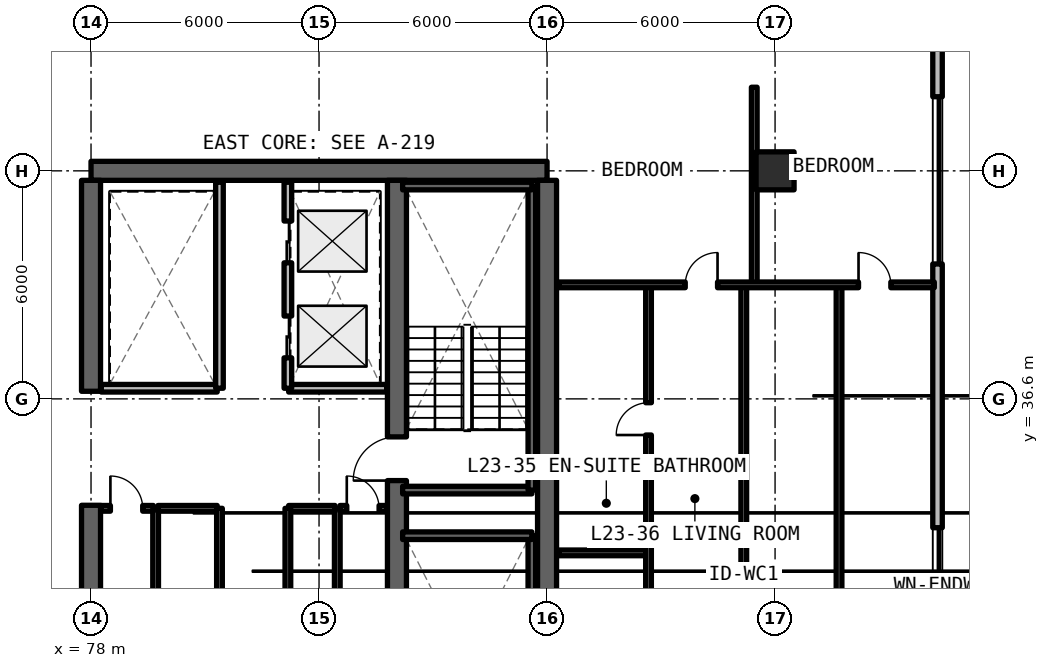
"""IFC4 building model, lengths in metres.
Left out: names, types, materials, properties, quantities, classifications, styles, units other than length and angle.
Written with IfcOpenShell. Run it as: python <this file> out.ifc"""

import sys

from ifc_helpers import new_model, si_unit, direction, frame, frame_2d, origin, origin_2d, place, context, subcontext, project, spatial, rectangle, extrude, element, fill, save


model = new_model("IFC4")
c1 = context("Model", 3, precision=1e-05, world=origin(), true_north=direction((0.0, 1.0)))
c2 = subcontext(c1, "Body", "Model", "MODEL_VIEW")
j1 = project(units=[si_unit("LENGTHUNIT", "METRE"), si_unit("PLANEANGLEUNIT", "RADIAN")], contexts=[c1])
p1 = place(None, origin())
s1 = spatial("IfcSite", under=j1, at=p1, CompositionType="ELEMENT")
p2 = place(p1, origin())
s2 = spatial("IfcBuilding", under=s1, at=p2, CompositionType="ELEMENT")
p3 = place(p2, frame((0.0, 0.0, 85.47)))
s3 = spatial("IfcBuildingStorey", under=s2, at=p3, CompositionType="ELEMENT", Elevation=85.47)
p4 = place(p3, frame((90.0, 42.6, 0.0), z_axis=(0.0, 0.0, 1.0), x_axis=(-1.0, 0.0, 0.0)))
e1 = element("IfcWall", 1, at=p4, inside=s3, PredefinedType="SHEAR", context=c2, shape_type="SweptSolid", body=[
    extrude(rectangle(XDim=12.0, YDim=0.5, at=frame_2d((6.0, 0.0))), origin(), (0.0, 0.0, 1.0), 3.3),
])
p5 = place(p3, frame((90.0, 24.85, 0.0), z_axis=(0.0, 0.0, 1.0), x_axis=(0.0, 1.0, 0.0)))
e2 = element("IfcWall", 2, at=p5, inside=s3, PredefinedType="SHEAR", context=c2, shape_type="SweptSolid", body=[
    extrude(rectangle(XDim=17.5, YDim=0.5, at=frame_2d((8.75, 0.0))), origin(), (0.0, 0.0, 1.0), 3.3),
])
p6 = place(p3, frame((78.0, 24.85, 0.0), z_axis=(0.0, 0.0, 1.0), x_axis=(0.0, 1.0, 0.0)))
e3 = element("IfcWall", 3, at=p6, inside=s3, PredefinedType="SHEAR", context=c2, shape_type="SweptSolid", body=[
    extrude(rectangle(XDim=8.95, YDim=0.5, at=frame_2d((4.475, 0.0))), origin(), (0.0, 0.0, 1.0), 3.3),
])
p7 = place(p3, frame((78.0, 36.8, 0.0), z_axis=(0.0, 0.0, 1.0), x_axis=(0.0, 1.0, 0.0)))
e4 = element("IfcWall", 4, at=p7, inside=s3, PredefinedType="SHEAR", context=c2, shape_type="SweptSolid", body=[
    extrude(rectangle(XDim=5.55, YDim=0.5, at=frame_2d((2.775, 0.0))), origin(), (0.0, 0.0, 1.0), 3.3),
])
p8 = place(p3, frame((86.05, 24.85, 0.0), z_axis=(0.0, 0.0, 1.0), x_axis=(0.0, 1.0, 0.0)))
e5 = element("IfcWall", 5, at=p8, inside=s3, PredefinedType="SHEAR", context=c2, shape_type="SweptSolid", body=[
    extrude(rectangle(XDim=17.5, YDim=0.5, at=frame_2d((8.75, 0.0))), origin(), (0.0, 0.0, 1.0), 3.3),
])
p9 = place(p8, frame((0.4, 0.0, 0.0)))
e6 = element("IfcOpeningElement", 6, at=p9, cuts=e5, PredefinedType="OPENING", context=c2, shape_type="SweptSolid", body=[
    extrude(rectangle(XDim=1.15, YDim=2.15, at=frame_2d((0.575, 1.075))), frame((0.0, 0.26, 0.0), z_axis=(0.0, -1.0, 0.0), x_axis=(1.0, 0.0, 0.0)), (0.0, 0.0, 1.0), 0.52),
])
p10 = place(p8, frame((9.6, 0.0, 0.0)))
e7 = element("IfcOpeningElement", 7, at=p10, cuts=e5, PredefinedType="OPENING", context=c2, shape_type="SweptSolid", body=[
    extrude(rectangle(XDim=1.15, YDim=2.15, at=frame_2d((0.575, 1.075))), frame((0.0, 0.26, 0.0), z_axis=(0.0, -1.0, 0.0), x_axis=(1.0, 0.0, 0.0)), (0.0, 0.0, 1.0), 0.52),
])
p11 = place(p3, frame((96.0, 42.6, 0.0), z_axis=(0.0, 0.0, 1.0), x_axis=(1.0, 0.0, 0.0)))
e8 = element("IfcColumn", 8, at=p11, inside=s3, PredefinedType="COLUMN", context=c2, shape_type="SweptSolid", body=[
    extrude(rectangle(XDim=1.0, YDim=1.0, at=origin_2d()), origin(), (0.0, 0.0, 1.0), 3.3),
])
p12 = place(p3, frame((100.275, 13.852, 0.0), z_axis=(0.0, 0.0, 1.0), x_axis=(0.0, 1.0, 0.0)))
e9 = element("IfcWall", 9, at=p12, inside=s3, PredefinedType="SOLIDWALL", context=c2, shape_type="SweptSolid", body=[
    extrude(rectangle(XDim=39.496, YDim=0.25, at=frame_2d((19.748, 0.0))), origin(), (0.0, 0.0, 1.0), 3.08),
])
p13 = place(p12, frame((36.448, 0.0, 0.0)))
e10 = element("IfcOpeningElement", 10, at=p13, cuts=e9, PredefinedType="OPENING", context=c2, shape_type="SweptSolid", body=[
    extrude(rectangle(XDim=1.1, YDim=2.15, at=frame_2d((0.55, 1.075))), frame((0.0, 0.135, 0.0), z_axis=(0.0, -1.0, 0.0), x_axis=(1.0, 0.0, 0.0)), (0.0, 0.0, 1.0), 0.27),
])
p14 = place(p12, frame((14.958, 0.0, 0.78)))
e11 = element("IfcOpeningElement", 11, at=p14, cuts=e9, PredefinedType="OPENING", context=c2, shape_type="SweptSolid", body=[
    extrude(rectangle(XDim=4.4, YDim=1.66, at=frame_2d((2.2, 0.83))), frame((0.0, 0.135, 0.0), z_axis=(0.0, -1.0, 0.0), x_axis=(1.0, 0.0, 0.0)), (0.0, 0.0, 1.0), 0.27),
])
p15 = place(p12, frame((26.298, 0.0, 0.78)))
e12 = element("IfcOpeningElement", 12, at=p15, cuts=e9, PredefinedType="OPENING", context=c2, shape_type="SweptSolid", body=[
    extrude(rectangle(XDim=4.4, YDim=1.66, at=frame_2d((2.2, 0.83))), frame((0.0, 0.135, 0.0), z_axis=(0.0, -1.0, 0.0), x_axis=(1.0, 0.0, 0.0)), (0.0, 0.0, 1.0), 0.27),
])
p16 = place(p12, frame((2.454, 0.0, 0.78)))
e13 = element("IfcOpeningElement", 13, at=p16, cuts=e9, PredefinedType="OPENING", context=c2, shape_type="SweptSolid", body=[
    extrude(rectangle(XDim=1.4, YDim=1.65, at=frame_2d((0.7, 0.825))), frame((0.0, 0.135, 0.0), z_axis=(0.0, -1.0, 0.0), x_axis=(1.0, 0.0, 0.0)), (0.0, 0.0, 1.0), 0.27),
])
p17 = place(p3, frame((84.48, 28.5, 0.0), z_axis=(0.0, 0.0, 1.0), x_axis=(0.0, 1.0, 0.0)))
e14 = element("IfcWall", 14, at=p17, inside=s3, PredefinedType="SOLIDWALL", context=c2, shape_type="SweptSolid", body=[
    extrude(rectangle(XDim=5.22, YDim=0.15, at=frame_2d((2.61, 0.0))), origin(), (0.0, 0.0, 1.0), 2.35),
])
p18 = place(p3, frame((84.55, 33.72, 0.0), z_axis=(0.0, 0.0, 1.0), x_axis=(1.0, 0.0, 0.0)))
e15 = element("IfcWall", 15, at=p18, inside=s3, PredefinedType="SOLIDWALL", context=c2, shape_type="SweptSolid", body=[
    extrude(rectangle(XDim=1.23, YDim=0.15, at=frame_2d((0.615, 0.0))), origin(), (0.0, 0.0, 1.0), 2.35),
])
p19 = place(p18, frame((0.18, 0.0, 0.0)))
e16 = element("IfcOpeningElement", 16, at=p19, cuts=e15, PredefinedType="OPENING", context=c2, shape_type="SweptSolid", body=[
    extrude(rectangle(XDim=0.85, YDim=2.1, at=frame_2d((0.425, 1.05))), frame((0.0, 0.085, 0.0), z_axis=(0.0, -1.0, 0.0), x_axis=(1.0, 0.0, 0.0)), (0.0, 0.0, 1.0), 0.17),
])
p20 = place(p3, frame((83.2, 33.72, 0.0), z_axis=(0.0, 0.0, 1.0), x_axis=(1.0, 0.0, 0.0)))
e17 = element("IfcWall", 17, at=p20, inside=s3, PredefinedType="SOLIDWALL", context=c2, shape_type="SweptSolid", body=[
    extrude(rectangle(XDim=1.22, YDim=0.15, at=frame_2d((0.61, 0.0))), origin(), (0.0, 0.0, 1.0), 2.35),
])
p21 = place(p3, frame((83.18, 28.5, 0.0), z_axis=(0.0, 0.0, 1.0), x_axis=(0.0, 1.0, 0.0)))
e18 = element("IfcWall", 18, at=p21, inside=s3, PredefinedType="SOLIDWALL", context=c2, shape_type="SweptSolid", body=[
    extrude(rectangle(XDim=5.22, YDim=0.15, at=frame_2d((2.61, 0.0))), origin(), (0.0, 0.0, 1.0), 2.35),
])
p22 = place(p21, frame((2.0, 0.0, 0.0)))
e19 = element("IfcOpeningElement", 19, at=p22, cuts=e18, PredefinedType="OPENING", context=c2, shape_type="SweptSolid", body=[
    extrude(rectangle(XDim=0.95, YDim=2.15, at=frame_2d((0.475, 1.075))), frame((0.0, 0.085, 0.0), z_axis=(0.0, -1.0, 0.0), x_axis=(1.0, 0.0, 0.0)), (0.0, 0.0, 1.0), 0.17),
])
p23 = place(p3, frame((79.7, 28.5, 0.0), z_axis=(0.0, 0.0, 1.0), x_axis=(0.0, 1.0, 0.0)))
e20 = element("IfcWall", 20, at=p23, inside=s3, PredefinedType="SOLIDWALL", context=c2, shape_type="SweptSolid", body=[
    extrude(rectangle(XDim=5.22, YDim=0.15, at=frame_2d((2.61, 0.0))), origin(), (0.0, 0.0, 1.0), 2.35),
])
p24 = place(p3, frame((79.76, 33.72, 0.0), z_axis=(0.0, 0.0, 1.0), x_axis=(1.0, 0.0, 0.0)))
e21 = element("IfcWall", 21, at=p24, inside=s3, PredefinedType="SOLIDWALL", context=c2, shape_type="SweptSolid", body=[
    extrude(rectangle(XDim=1.56, YDim=0.15, at=frame_2d((0.78, 0.0))), origin(), (0.0, 0.0, 1.0), 2.35),
])
p25 = place(p3, frame((78.27, 33.72, 0.0), z_axis=(0.0, 0.0, 1.0), x_axis=(1.0, 0.0, 0.0)))
e22 = element("IfcWall", 22, at=p25, inside=s3, PredefinedType="SOLIDWALL", context=c2, shape_type="SweptSolid", body=[
    extrude(rectangle(XDim=1.37, YDim=0.15, at=frame_2d((0.685, 0.0))), origin(), (0.0, 0.0, 1.0), 2.35),
])
p26 = place(p25, frame((0.24, 0.0, 0.0)))
e23 = element("IfcOpeningElement", 23, at=p26, cuts=e22, PredefinedType="OPENING", context=c2, shape_type="SweptSolid", body=[
    extrude(rectangle(XDim=0.85, YDim=2.1, at=frame_2d((0.425, 1.05))), frame((0.0, 0.085, 0.0), z_axis=(0.0, -1.0, 0.0), x_axis=(1.0, 0.0, 0.0)), (0.0, 0.0, 1.0), 0.17),
])
p27 = place(p3, frame((81.38, 28.5, 0.0), z_axis=(0.0, 0.0, 1.0), x_axis=(0.0, 1.0, 0.0)))
e24 = element("IfcWall", 24, at=p27, inside=s3, PredefinedType="SOLIDWALL", context=c2, shape_type="SweptSolid", body=[
    extrude(rectangle(XDim=5.22, YDim=0.15, at=frame_2d((2.61, 0.0))), origin(), (0.0, 0.0, 1.0), 2.35),
])
p28 = place(p27, frame((2.0, 0.0, 0.0)))
e25 = element("IfcOpeningElement", 25, at=p28, cuts=e24, PredefinedType="OPENING", context=c2, shape_type="SweptSolid", body=[
    extrude(rectangle(XDim=0.95, YDim=2.15, at=frame_2d((0.475, 1.075))), frame((0.0, 0.085, 0.0), z_axis=(0.0, -1.0, 0.0), x_axis=(1.0, 0.0, 0.0)), (0.0, 0.0, 1.0), 0.17),
])
p29 = place(p3, frame((83.2, 36.88, 0.0), z_axis=(0.0, 0.0, 1.0), x_axis=(1.0, 0.0, 0.0)))
e26 = element("IfcWall", 26, at=p29, inside=s3, PredefinedType="SOLIDWALL", context=c2, shape_type="SweptSolid", body=[
    extrude(rectangle(XDim=2.58, YDim=0.2, at=frame_2d((1.29, 0.0))), origin(), (0.0, 0.0, 1.0), 2.35),
])
p30 = place(p3, frame((83.18, 36.88, 0.0), z_axis=(0.0, 0.0, 1.0), x_axis=(0.0, 1.0, 0.0)))
e27 = element("IfcWall", 27, at=p30, inside=s3, PredefinedType="SOLIDWALL", context=c2, shape_type="SweptSolid", body=[
    extrude(rectangle(XDim=5.42, YDim=0.2, at=frame_2d((2.71, 0.0))), origin(), (0.0, 0.0, 1.0), 2.35),
])
p31 = place(p30, frame((0.8, 0.0, 0.0)))
e28 = element("IfcOpeningElement", 28, at=p31, cuts=e27, PredefinedType="OPENING", context=c2, shape_type="SweptSolid", body=[
    extrude(rectangle(XDim=1.1, YDim=2.2, at=frame_2d((0.55, 1.1))), frame((0.0, 0.11, 0.0), z_axis=(0.0, -1.0, 0.0), x_axis=(1.0, 0.0, 0.0)), (0.0, 0.0, 1.0), 0.22),
])
p32 = place(p30, frame((3.3, 0.0, 0.0)))
e29 = element("IfcOpeningElement", 29, at=p32, cuts=e27, PredefinedType="OPENING", context=c2, shape_type="SweptSolid", body=[
    extrude(rectangle(XDim=1.1, YDim=2.2, at=frame_2d((0.55, 1.1))), frame((0.0, 0.11, 0.0), z_axis=(0.0, -1.0, 0.0), x_axis=(1.0, 0.0, 0.0)), (0.0, 0.0, 1.0), 0.22),
])
p33 = place(p3, frame((78.27, 36.88, 0.0), z_axis=(0.0, 0.0, 1.0), x_axis=(1.0, 0.0, 0.0)))
e30 = element("IfcWall", 30, at=p33, inside=s3, PredefinedType="SOLIDWALL", context=c2, shape_type="SweptSolid", body=[
    extrude(rectangle(XDim=3.05, YDim=0.2, at=frame_2d((1.525, 0.0))), origin(), (0.0, 0.0, 1.0), 2.35),
])
p34 = place(p3, frame((81.38, 36.88, 0.0), z_axis=(0.0, 0.0, 1.0), x_axis=(0.0, 1.0, 0.0)))
e31 = element("IfcWall", 31, at=p34, inside=s3, PredefinedType="SOLIDWALL", context=c2, shape_type="SweptSolid", body=[
    extrude(rectangle(XDim=5.42, YDim=0.2, at=frame_2d((2.71, 0.0))), origin(), (0.0, 0.0, 1.0), 2.35),
])
p35 = place(p3, frame((95.177, 22.4, 0.0), z_axis=(0.0, 0.0, 1.0), x_axis=(0.0, 1.0, 0.0)))
e32 = element("IfcWall", 32, at=p35, inside=s3, PredefinedType="PARTITIONING", context=c2, shape_type="SweptSolid", body=[
    extrude(rectangle(XDim=17.2, YDim=0.15, at=frame_2d((8.6, 0.0))), origin(), (0.0, 0.0, 1.0), 2.35),
])
p36 = place(p35, frame((8.175, 0.0, 0.0)))
e33 = element("IfcOpeningElement", 33, at=p36, cuts=e32, PredefinedType="OPENING", context=c2, shape_type="SweptSolid", body=[
    extrude(rectangle(XDim=0.85, YDim=2.1, at=frame_2d((0.425, 1.05))), frame((0.0, 0.085, 0.0), z_axis=(0.0, -1.0, 0.0), x_axis=(1.0, 0.0, 0.0)), (0.0, 0.0, 1.0), 0.17),
])
p37 = place(p3, frame((97.683, 22.4, 0.0), z_axis=(0.0, 0.0, 1.0), x_axis=(0.0, 1.0, 0.0)))
e34 = element("IfcWall", 34, at=p37, inside=s3, PredefinedType="PARTITIONING", context=c2, shape_type="SweptSolid", body=[
    extrude(rectangle(XDim=17.2, YDim=0.15, at=frame_2d((8.6, 0.0))), origin(), (0.0, 0.0, 1.0), 2.35),
])
p38 = place(p37, frame((8.175, 0.0, 0.0)))
e35 = element("IfcOpeningElement", 35, at=p38, cuts=e34, PredefinedType="OPENING", context=c2, shape_type="SweptSolid", body=[
    extrude(rectangle(XDim=0.85, YDim=2.1, at=frame_2d((0.425, 1.05))), frame((0.0, 0.085, 0.0), z_axis=(0.0, -1.0, 0.0), x_axis=(1.0, 0.0, 0.0)), (0.0, 0.0, 1.0), 0.17),
])
p39 = place(p3, frame((90.32, 32.548, 0.0), z_axis=(0.0, 0.0, 1.0), x_axis=(1.0, 0.0, 0.0)))
e36 = element("IfcWall", 36, at=p39, inside=s3, PredefinedType="PARTITIONING", context=c2, shape_type="SweptSolid", body=[
    extrude(rectangle(XDim=2.35, YDim=0.15, at=frame_2d((1.175, 0.0))), origin(), (0.0, 0.0, 1.0), 2.35),
])
p40 = place(p3, frame((92.67, 22.4, 0.0), z_axis=(0.0, 0.0, 1.0), x_axis=(0.0, 1.0, 0.0)))
e37 = element("IfcWall", 37, at=p40, inside=s3, PredefinedType="PARTITIONING", context=c2, shape_type="SweptSolid", body=[
    extrude(rectangle(XDim=17.2, YDim=0.15, at=frame_2d((8.6, 0.0))), origin(), (0.0, 0.0, 1.0), 2.35),
])
p41 = place(p40, frame((4.649, 0.0, 0.0)))
e38 = element("IfcOpeningElement", 38, at=p41, cuts=e37, PredefinedType="OPENING", context=c2, shape_type="SweptSolid", body=[
    extrude(rectangle(XDim=0.85, YDim=2.1, at=frame_2d((0.425, 1.05))), frame((0.0, 0.085, 0.0), z_axis=(0.0, -1.0, 0.0), x_axis=(1.0, 0.0, 0.0)), (0.0, 0.0, 1.0), 0.17),
])
p42 = place(p40, frame((13.249, 0.0, 0.0)))
e39 = element("IfcOpeningElement", 39, at=p42, cuts=e37, PredefinedType="OPENING", context=c2, shape_type="SweptSolid", body=[
    extrude(rectangle(XDim=0.85, YDim=2.1, at=frame_2d((0.425, 1.05))), frame((0.0, 0.085, 0.0), z_axis=(0.0, -1.0, 0.0), x_axis=(1.0, 0.0, 0.0)), (0.0, 0.0, 1.0), 0.17),
])
p43 = place(p3, frame((95.452, 39.6, 0.0), z_axis=(0.0, 0.0, 1.0), x_axis=(0.0, 1.0, 0.0)))
e40 = element("IfcWall", 40, at=p43, inside=s3, PredefinedType="PARTITIONING", context=c2, shape_type="SweptSolid", body=[
    extrude(rectangle(XDim=5.2, YDim=0.15, at=frame_2d((2.6, 0.0))), origin(), (0.0, 0.0, 1.0), 2.35),
])
p44 = place(p3, frame((90.32, 39.6, 0.0), z_axis=(0.0, 0.0, 1.0), x_axis=(1.0, 0.0, 0.0)))
e41 = element("IfcWall", 41, at=p44, inside=s3, PredefinedType="PARTITIONING", context=c2, shape_type="SweptSolid", body=[
    extrude(rectangle(XDim=9.87, YDim=0.15, at=frame_2d((4.935, 0.0))), origin(), (0.0, 0.0, 1.0), 2.35),
])
p45 = place(p44, frame((3.316, 0.0, 0.0)))
e42 = element("IfcOpeningElement", 42, at=p45, cuts=e41, PredefinedType="OPENING", context=c2, shape_type="SweptSolid", body=[
    extrude(rectangle(XDim=0.85, YDim=2.1, at=frame_2d((0.425, 1.05))), frame((0.0, 0.085, 0.0), z_axis=(0.0, -1.0, 0.0), x_axis=(1.0, 0.0, 0.0)), (0.0, 0.0, 1.0), 0.17),
])
p46 = place(p44, frame((7.876, 0.0, 0.0)))
e43 = element("IfcOpeningElement", 43, at=p46, cuts=e41, PredefinedType="OPENING", context=c2, shape_type="SweptSolid", body=[
    extrude(rectangle(XDim=0.85, YDim=2.1, at=frame_2d((0.425, 1.05))), frame((0.0, 0.085, 0.0), z_axis=(0.0, -1.0, 0.0), x_axis=(1.0, 0.0, 0.0)), (0.0, 0.0, 1.0), 0.17),
])
p47 = place(p3, frame((89.6, 25.0, 0.0), z_axis=(0.0, 0.0, 1.0), x_axis=(0.0, 1.0, 0.0)))
e44 = element("IfcWall", 44, at=p47, inside=s3, PredefinedType="SOLIDWALL", context=c2, shape_type="SweptSolid", body=[
    extrude(rectangle(XDim=8.0, YDim=0.2, at=frame_2d((4.0, 0.0))), origin(), (0.0, 0.0, 1.0), 3.3),
])
for number, where, z_axis, x_axis in (
    (45, (89.6, 33.0, 0.0), (0.0, 0.0, 1.0), (-1.0, 0.0, 0.0)),
    (46, (86.2, 34.2, 0.0), (0.0, 0.0, 1.0), (1.0, 0.0, 0.0)),
):
    element("IfcWall", number, at=place(p3, frame(where, z_axis=z_axis, x_axis=x_axis)), inside=s3, PredefinedType="SOLIDWALL", context=c2, shape_type="SweptSolid", body=[
        extrude(rectangle(XDim=3.4, YDim=0.2, at=frame_2d((1.7, 0.0))), origin(), (0.0, 0.0, 1.0), 3.3),
    ])
p48 = place(p3, frame((89.6, 34.2, 0.0), z_axis=(0.0, 0.0, 1.0), x_axis=(0.0, 1.0, 0.0)))
e47 = element("IfcWall", 47, at=p48, inside=s3, PredefinedType="SOLIDWALL", context=c2, shape_type="SweptSolid", body=[
    extrude(rectangle(XDim=8.0, YDim=0.2, at=frame_2d((4.0, 0.0))), origin(), (0.0, 0.0, 1.0), 3.3),
])
p49 = place(p3, frame((89.6, 42.2, 0.0), z_axis=(0.0, 0.0, 1.0), x_axis=(-1.0, 0.0, 0.0)))
e48 = element("IfcWall", 48, at=p49, inside=s3, PredefinedType="SOLIDWALL", context=c2, shape_type="SweptSolid", body=[
    extrude(rectangle(XDim=3.4, YDim=0.2, at=frame_2d((1.7, 0.0))), origin(), (0.0, 0.0, 1.0), 3.3),
])
p50 = place(p14, origin())
e49 = element("IfcWindow", 49, at=p50, inside=s3, PartitioningType="SINGLE_PANEL", PredefinedType="WINDOW", context=c2, shape_type="SweptSolid", body=[
    extrude(rectangle(XDim=4.4, YDim=1.66, at=frame_2d((2.2, 0.83))), frame((0.0, 0.03, 0.0), z_axis=(0.0, -1.0, 0.0), x_axis=(1.0, 0.0, 0.0)), (0.0, 0.0, 1.0), 0.06),
])
fill(e11, e49)
p51 = place(p15, origin())
e50 = element("IfcWindow", 50, at=p51, inside=s3, PartitioningType="SINGLE_PANEL", PredefinedType="WINDOW", context=c2, shape_type="SweptSolid", body=[
    extrude(rectangle(XDim=4.4, YDim=1.66, at=frame_2d((2.2, 0.83))), frame((0.0, 0.03, 0.0), z_axis=(0.0, -1.0, 0.0), x_axis=(1.0, 0.0, 0.0)), (0.0, 0.0, 1.0), 0.06),
])
fill(e12, e50)
p52 = place(p19, origin())
e51 = element("IfcDoor", 51, at=p52, inside=s3, OperationType="SINGLE_SWING_LEFT", PredefinedType="DOOR", context=c2, shape_type="SweptSolid", body=[
    extrude(rectangle(XDim=0.85, YDim=2.1, at=frame_2d((0.425, 1.05))), frame((0.0, 0.025, 0.0), z_axis=(0.0, -1.0, 0.0), x_axis=(1.0, 0.0, 0.0)), (0.0, 0.0, 1.0), 0.05),
])
fill(e16, e51)
p53 = place(p26, origin())
e52 = element("IfcDoor", 52, at=p53, inside=s3, OperationType="SINGLE_SWING_LEFT", PredefinedType="DOOR", context=c2, shape_type="SweptSolid", body=[
    extrude(rectangle(XDim=0.85, YDim=2.1, at=frame_2d((0.425, 1.05))), frame((0.0, 0.025, 0.0), z_axis=(0.0, -1.0, 0.0), x_axis=(1.0, 0.0, 0.0)), (0.0, 0.0, 1.0), 0.05),
])
fill(e23, e52)
p54 = place(p31, origin())
e53 = element("IfcDoor", 53, at=p54, inside=s3, OperationType="SLIDING_TO_LEFT", PredefinedType="DOOR", context=c2, shape_type="SweptSolid", body=[
    extrude(rectangle(XDim=1.1, YDim=2.2, at=frame_2d((0.55, 1.1))), frame((0.0, 0.025, 0.0), z_axis=(0.0, -1.0, 0.0), x_axis=(1.0, 0.0, 0.0)), (0.0, 0.0, 1.0), 0.05),
])
fill(e28, e53)
p55 = place(p32, origin())
e54 = element("IfcDoor", 54, at=p55, inside=s3, OperationType="SLIDING_TO_RIGHT", PredefinedType="DOOR", context=c2, shape_type="SweptSolid", body=[
    extrude(rectangle(XDim=1.1, YDim=2.2, at=frame_2d((0.55, 1.1))), frame((0.0, 0.025, 0.0), z_axis=(0.0, -1.0, 0.0), x_axis=(1.0, 0.0, 0.0)), (0.0, 0.0, 1.0), 0.05),
])
fill(e29, e54)
p56 = place(p42, origin())
e55 = element("IfcDoor", 55, at=p56, inside=s3, OperationType="SINGLE_SWING_LEFT", PredefinedType="DOOR", context=c2, shape_type="SweptSolid", body=[
    extrude(rectangle(XDim=0.85, YDim=2.1, at=frame_2d((0.425, 1.05))), frame((0.0, 0.025, 0.0), z_axis=(0.0, -1.0, 0.0), x_axis=(1.0, 0.0, 0.0)), (0.0, 0.0, 1.0), 0.05),
])
fill(e39, e55)
p57 = place(p45, origin())
e56 = element("IfcDoor", 56, at=p57, inside=s3, OperationType="SINGLE_SWING_RIGHT", PredefinedType="DOOR", context=c2, shape_type="SweptSolid", body=[
    extrude(rectangle(XDim=0.85, YDim=2.1, at=frame_2d((0.425, 1.05))), frame((0.0, 0.025, 0.0), z_axis=(0.0, -1.0, 0.0), x_axis=(1.0, 0.0, 0.0)), (0.0, 0.0, 1.0), 0.05),
])
fill(e42, e56)
p58 = place(p46, origin())
e57 = element("IfcDoor", 57, at=p58, inside=s3, OperationType="SINGLE_SWING_LEFT", PredefinedType="DOOR", context=c2, shape_type="SweptSolid", body=[
    extrude(rectangle(XDim=0.85, YDim=2.1, at=frame_2d((0.425, 1.05))), frame((0.0, 0.025, 0.0), z_axis=(0.0, -1.0, 0.0), x_axis=(1.0, 0.0, 0.0)), (0.0, 0.0, 1.0), 0.05),
])
fill(e43, e57)
p59 = place(p10, origin())
e58 = element("IfcDoor", 58, at=p59, inside=s3, OperationType="SINGLE_SWING_RIGHT", PredefinedType="DOOR", context=c2, shape_type="SweptSolid", body=[
    extrude(rectangle(XDim=1.15, YDim=2.15, at=frame_2d((0.575, 1.075))), frame((0.0, 0.025, 0.0), z_axis=(0.0, -1.0, 0.0), x_axis=(1.0, 0.0, 0.0)), (0.0, 0.0, 1.0), 0.05),
])
fill(e7, e58)
save(model, sys.argv[1])
